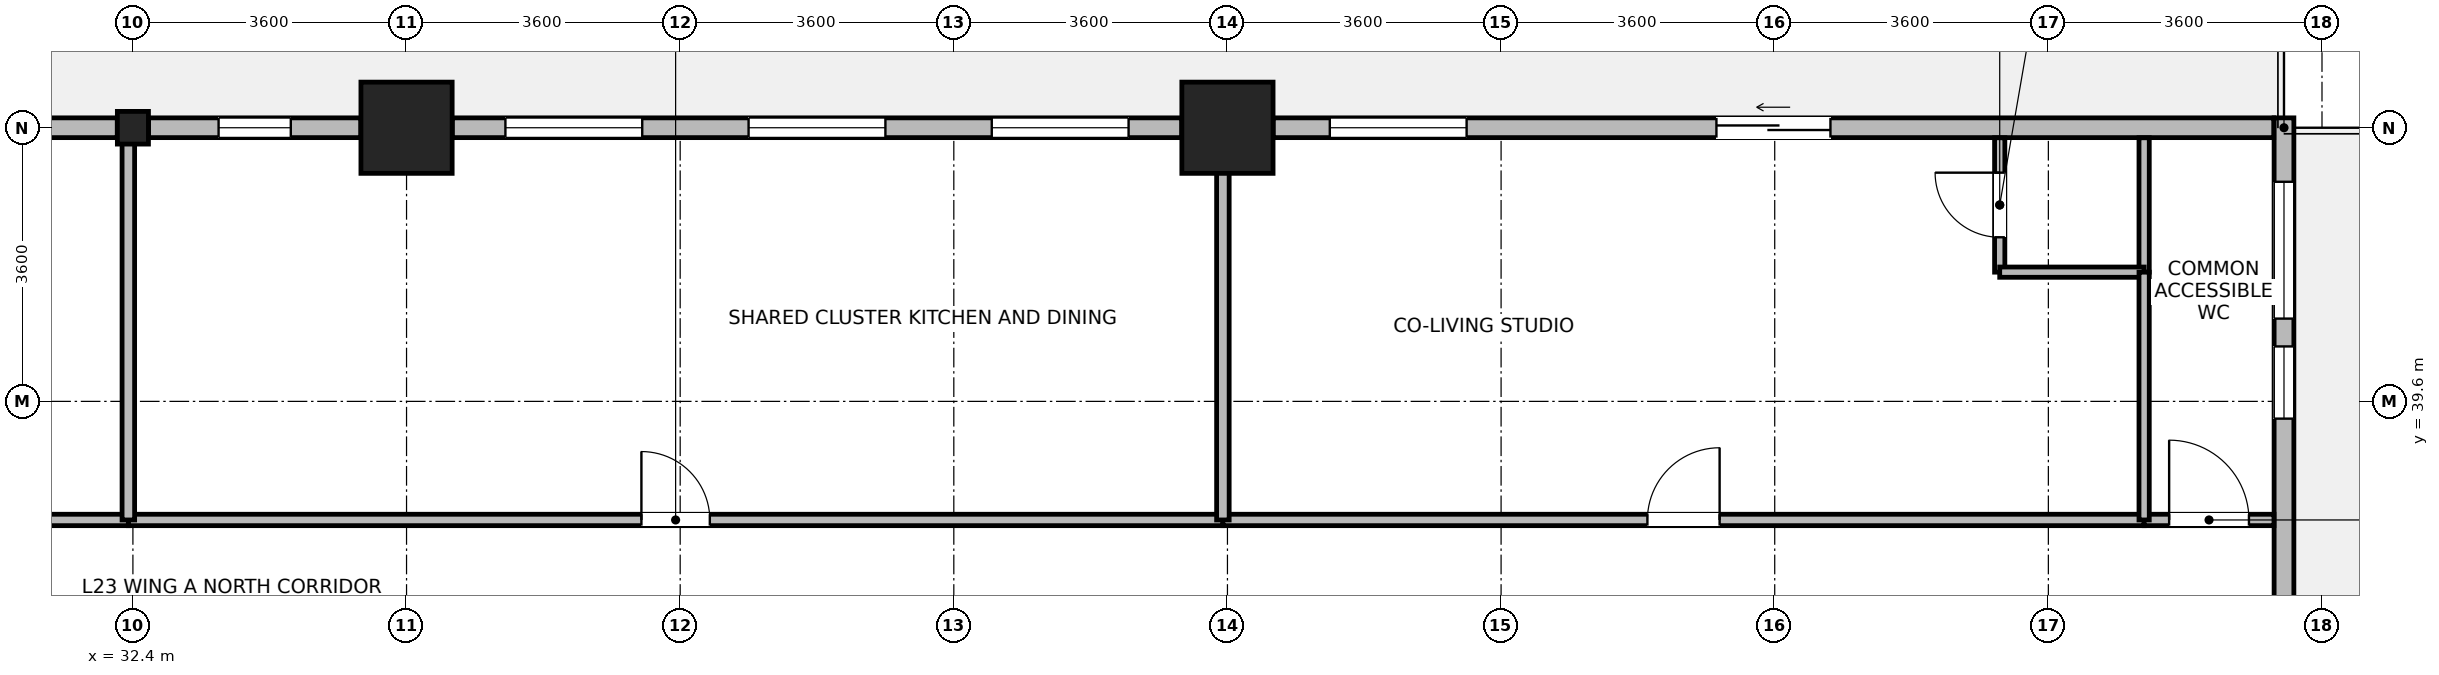
"""IFC4 building model, lengths in metres.
Left out: names, types, materials, properties, quantities, classifications, styles, units other than length and angle.
Written with IfcOpenShell. Run it as: python <this file> out.ifc"""

import sys

from ifc_helpers import new_model, si_unit, direction, frame, frame_2d, origin, origin_2d, place, context, subcontext, project, spatial, rectangle, i_section, extrude, source, transform, mapped, element, fill, save


model = new_model("IFC4")
c1 = context("Model", 3, precision=1e-05, world=origin(), true_north=direction((0.0, 1.0)))
c2 = subcontext(c1, "Body", "Model", "MODEL_VIEW")
j1 = project(units=[si_unit("LENGTHUNIT", "METRE"), si_unit("PLANEANGLEUNIT", "RADIAN")], contexts=[c1])
p1 = place(None, origin())
s1 = spatial("IfcSite", under=j1, at=p1, CompositionType="ELEMENT")
p2 = place(p1, origin())
s2 = spatial("IfcBuilding", under=s1, at=p2, CompositionType="ELEMENT")
p3 = place(p2, frame((0.0, 0.0, 93.4)))
s3 = spatial("IfcBuildingStorey", under=s2, at=p3, CompositionType="ELEMENT", Elevation=93.4)
m1 = source(origin(), c2, "Body", "SweptSolid", [
    extrude(rectangle(XDim=1.2, YDim=1.2, at=origin_2d()), origin(), (0.0, 0.0, 1.0), 3.7),
])
for number, where, z_axis, x_axis in (
    (1, (36.0, 43.2, 0.0), (0.0, 0.0, 1.0), (1.0, 0.0, 0.0)),
    (2, (46.8, 43.2, 0.0), (0.0, 0.0, 1.0), (1.0, 0.0, 0.0)),
):
    element("IfcColumn", number, at=place(p3, frame(where, z_axis=z_axis, x_axis=x_axis)), inside=s3, PredefinedType="COLUMN", context=c2, shape_type="MappedRepresentation", body=[
        mapped(m1, transform((0.0, 0.0, 0.0), x_axis=(1.0, 0.0, 0.0), y_axis=(0.0, 1.0, 0.0), z_axis=(0.0, 0.0, 1.0), scale=1.0)),
    ])
m2 = source(origin(), c2, "Body", "SweptSolid", [
    extrude(i_section(OverallWidth=0.409, OverallDepth=0.43, WebThickness=0.024, FlangeThickness=0.033, FilletRadius=0.015, at=origin_2d()), origin(), (0.0, 0.0, 1.0), 3.7),
])
p4 = place(p3, frame((32.4, 43.2, 0.0), z_axis=(0.0, 0.0, 1.0), x_axis=(1.0, 0.0, 0.0)))
e3 = element("IfcColumn", 3, at=p4, inside=s3, PredefinedType="COLUMN", context=c2, shape_type="MappedRepresentation", body=[
    mapped(m2, transform((0.0, 0.0, 0.0), x_axis=(1.0, 0.0, 0.0), y_axis=(0.0, 1.0, 0.0), z_axis=(0.0, 0.0, 1.0), scale=1.0)),
])
p5 = place(p3, frame((60.7, 43.33, 0.0), z_axis=(0.0, 0.0, 1.0), x_axis=(0.0, -1.0, 0.0)))
e4 = element("IfcWall", 4, at=p5, inside=s3, PredefinedType="STANDARD", context=c2, shape_type="SweptSolid", body=[
    extrude(rectangle(XDim=6.964, YDim=0.26, at=frame_2d((3.482, 0.0))), origin(), (0.0, 0.0, 1.0), 3.43),
])
p6 = place(p5, frame((0.841, 0.0, 0.85)))
e5 = element("IfcOpeningElement", 5, at=p6, cuts=e4, PredefinedType="OPENING", context=c2, shape_type="SweptSolid", body=[
    extrude(rectangle(XDim=1.8, YDim=1.85, at=frame_2d((0.9, 0.925))), frame((0.0, 0.14, 0.0), z_axis=(0.0, -1.0, 0.0), x_axis=(1.0, 0.0, 0.0)), (0.0, 0.0, 1.0), 0.28),
])
p7 = place(p5, frame((3.007, 0.0, 0.85)))
e6 = element("IfcOpeningElement", 6, at=p7, cuts=e4, PredefinedType="OPENING", context=c2, shape_type="SweptSolid", body=[
    extrude(rectangle(XDim=0.95, YDim=1.75, at=frame_2d((0.475, 0.875))), frame((0.0, 0.14, 0.0), z_axis=(0.0, -1.0, 0.0), x_axis=(1.0, 0.0, 0.0)), (0.0, 0.0, 1.0), 0.28),
])
p8 = place(p3, frame((47.401, 43.2, 0.0), z_axis=(0.0, 0.0, 1.0), x_axis=(1.0, 0.0, 0.0)))
e7 = element("IfcWall", 7, at=p8, inside=s3, PredefinedType="STANDARD", context=c2, shape_type="SweptSolid", body=[
    extrude(rectangle(XDim=13.164, YDim=0.26, at=frame_2d((6.582, 0.0))), origin(), (0.0, 0.0, 1.0), 3.43),
])
p9 = place(p8, frame((5.832, 0.0, 0.0)))
e8 = element("IfcOpeningElement", 8, at=p9, cuts=e7, PredefinedType="OPENING", context=c2, shape_type="SweptSolid", body=[
    extrude(rectangle(XDim=1.5, YDim=2.15, at=frame_2d((0.75, 1.075))), frame((0.0, 0.14, 0.0), z_axis=(0.0, -1.0, 0.0), x_axis=(1.0, 0.0, 0.0)), (0.0, 0.0, 1.0), 0.28),
])
p10 = place(p8, frame((0.746, 0.0, 0.85)))
e9 = element("IfcOpeningElement", 9, at=p10, cuts=e7, PredefinedType="OPENING", context=c2, shape_type="SweptSolid", body=[
    extrude(rectangle(XDim=1.8, YDim=1.85, at=frame_2d((0.9, 0.925))), frame((0.0, 0.14, 0.0), z_axis=(0.0, -1.0, 0.0), x_axis=(1.0, 0.0, 0.0)), (0.0, 0.0, 1.0), 0.28),
])
p11 = place(p3, frame((36.601, 43.2, 0.0), z_axis=(0.0, 0.0, 1.0), x_axis=(1.0, 0.0, 0.0)))
e10 = element("IfcWall", 10, at=p11, inside=s3, PredefinedType="STANDARD", context=c2, shape_type="SweptSolid", body=[
    extrude(rectangle(XDim=9.598, YDim=0.26, at=frame_2d((4.799, 0.0))), origin(), (0.0, 0.0, 1.0), 2.93),
])
p12 = place(p11, frame((0.7, 0.0, 0.85)))
e11 = element("IfcOpeningElement", 11, at=p12, cuts=e10, PredefinedType="OPENING", context=c2, shape_type="SweptSolid", body=[
    extrude(rectangle(XDim=1.8, YDim=1.85, at=frame_2d((0.9, 0.925))), frame((0.0, 0.14, 0.0), z_axis=(0.0, -1.0, 0.0), x_axis=(1.0, 0.0, 0.0)), (0.0, 0.0, 1.0), 0.28),
])
p13 = place(p11, frame((3.899, 0.0, 0.85)))
e12 = element("IfcOpeningElement", 12, at=p13, cuts=e10, PredefinedType="OPENING", context=c2, shape_type="SweptSolid", body=[
    extrude(rectangle(XDim=1.8, YDim=1.85, at=frame_2d((0.9, 0.925))), frame((0.0, 0.14, 0.0), z_axis=(0.0, -1.0, 0.0), x_axis=(1.0, 0.0, 0.0)), (0.0, 0.0, 1.0), 0.28),
])
p14 = place(p11, frame((7.098, 0.0, 0.85)))
e13 = element("IfcOpeningElement", 13, at=p14, cuts=e10, PredefinedType="OPENING", context=c2, shape_type="SweptSolid", body=[
    extrude(rectangle(XDim=1.8, YDim=1.85, at=frame_2d((0.9, 0.925))), frame((0.0, 0.14, 0.0), z_axis=(0.0, -1.0, 0.0), x_axis=(1.0, 0.0, 0.0)), (0.0, 0.0, 1.0), 0.28),
])
p15 = place(p3, frame((32.605, 43.2, 0.0), z_axis=(0.0, 0.0, 1.0), x_axis=(1.0, 0.0, 0.0)))
e14 = element("IfcWall", 14, at=p15, inside=s3, PredefinedType="STANDARD", context=c2, shape_type="SweptSolid", body=[
    extrude(rectangle(XDim=2.793, YDim=0.26, at=frame_2d((1.397, 0.0))), origin(), (0.0, 0.0, 1.0), 2.93),
])
p16 = place(p15, frame((0.922, 0.0, 0.85)))
e15 = element("IfcOpeningElement", 15, at=p16, cuts=e14, PredefinedType="OPENING", context=c2, shape_type="SweptSolid", body=[
    extrude(rectangle(XDim=0.95, YDim=1.75, at=frame_2d((0.475, 0.875))), frame((0.0, 0.14, 0.0), z_axis=(0.0, -1.0, 0.0), x_axis=(1.0, 0.0, 0.0)), (0.0, 0.0, 1.0), 0.28),
])
p17 = place(p3, frame((29.401, 43.2, 0.0), z_axis=(0.0, 0.0, 1.0), x_axis=(1.0, 0.0, 0.0)))
e16 = element("IfcWall", 16, at=p17, inside=s3, PredefinedType="STANDARD", context=c2, shape_type="SweptSolid", body=[
    extrude(rectangle(XDim=2.794, YDim=0.26, at=frame_2d((1.397, 0.0))), origin(), (0.0, 0.0, 1.0), 2.93),
])
p18 = place(p17, frame((0.922, 0.0, 0.85)))
e17 = element("IfcOpeningElement", 17, at=p18, cuts=e16, PredefinedType="OPENING", context=c2, shape_type="SweptSolid", body=[
    extrude(rectangle(XDim=0.95, YDim=1.75, at=frame_2d((0.475, 0.875))), frame((0.0, 0.14, 0.0), z_axis=(0.0, -1.0, 0.0), x_axis=(1.0, 0.0, 0.0)), (0.0, 0.0, 1.0), 0.28),
])
p19 = place(p3, frame((56.96, 41.3, 0.0), z_axis=(0.0, 0.0, 1.0), x_axis=(0.0, 1.0, 0.0)))
e18 = element("IfcWall", 18, at=p19, inside=s3, PredefinedType="PARTITIONING", context=c2, shape_type="SweptSolid", body=[
    extrude(rectangle(XDim=1.768, YDim=0.135, at=frame_2d((0.884, 0.0))), origin(), (0.0, 0.0, 1.0), 3.43),
])
p20 = place(p19, frame((0.459, 0.0, 0.0)))
e19 = element("IfcOpeningElement", 19, at=p20, cuts=e18, PredefinedType="OPENING", context=c2, shape_type="SweptSolid", body=[
    extrude(rectangle(XDim=0.85, YDim=2.04, at=frame_2d((0.425, 1.02))), frame((0.0, 0.078, 0.0), z_axis=(0.0, -1.0, 0.0), x_axis=(1.0, 0.0, 0.0)), (0.0, 0.0, 1.0), 0.155),
])
p21 = place(p3, frame((58.86, 41.3, 0.0), z_axis=(0.0, 0.0, 1.0), x_axis=(0.0, 1.0, 0.0)))
e20 = element("IfcWall", 20, at=p21, inside=s3, PredefinedType="PARTITIONING", context=c2, shape_type="SweptSolid", body=[
    extrude(rectangle(XDim=1.768, YDim=0.135, at=frame_2d((0.884, 0.0))), origin(), (0.0, 0.0, 1.0), 3.43),
])
p22 = place(p3, frame((56.96, 41.3, 0.0), z_axis=(0.0, 0.0, 1.0), x_axis=(1.0, 0.0, 0.0)))
e21 = element("IfcWall", 21, at=p22, inside=s3, PredefinedType="PARTITIONING", context=c2, shape_type="SweptSolid", body=[
    extrude(rectangle(XDim=1.9, YDim=0.135, at=frame_2d((0.95, 0.0))), origin(), (0.0, 0.0, 1.0), 3.43),
])
p23 = place(p3, frame((32.34, 38.04, 0.0), z_axis=(0.0, 0.0, 1.0), x_axis=(1.0, 0.0, 0.0)))
e22 = element("IfcWall", 22, at=p23, inside=s3, PredefinedType="PARTITIONING", context=c2, shape_type="SweptSolid", body=[
    extrude(rectangle(XDim=14.4, YDim=0.15, at=frame_2d((7.2, 0.0))), origin(), (0.0, 0.0, 1.0), 3.43),
])
p24 = place(p23, frame((6.75, 0.0, 0.0)))
e23 = element("IfcOpeningElement", 23, at=p24, cuts=e22, PredefinedType="OPENING", context=c2, shape_type="SweptSolid", body=[
    extrude(rectangle(XDim=0.9, YDim=2.08, at=frame_2d((0.45, 1.04))), frame((0.0, 0.085, 0.0), z_axis=(0.0, -1.0, 0.0), x_axis=(1.0, 0.0, 0.0)), (0.0, 0.0, 1.0), 0.17),
])
p25 = place(p3, frame((46.74, 38.04, 0.0), z_axis=(0.0, 0.0, 1.0), x_axis=(1.0, 0.0, 0.0)))
e24 = element("IfcWall", 24, at=p25, inside=s3, PredefinedType="PARTITIONING", context=c2, shape_type="SweptSolid", body=[
    extrude(rectangle(XDim=12.12, YDim=0.15, at=frame_2d((6.06, 0.0))), origin(), (0.0, 0.0, 1.0), 3.43),
])
p26 = place(p25, frame((5.585, 0.0, 0.0)))
e25 = element("IfcOpeningElement", 25, at=p26, cuts=e24, PredefinedType="OPENING", context=c2, shape_type="SweptSolid", body=[
    extrude(rectangle(XDim=0.95, YDim=2.1, at=frame_2d((0.475, 1.05))), frame((0.0, 0.085, 0.0), z_axis=(0.0, -1.0, 0.0), x_axis=(1.0, 0.0, 0.0)), (0.0, 0.0, 1.0), 0.17),
])
p27 = place(p3, frame((22.48, 38.04, 0.0), z_axis=(0.0, 0.0, 1.0), x_axis=(1.0, 0.0, 0.0)))
e26 = element("IfcWall", 26, at=p27, inside=s3, PredefinedType="PARTITIONING", context=c2, shape_type="SweptSolid", body=[
    extrude(rectangle(XDim=9.86, YDim=0.15, at=frame_2d((4.93, 0.0))), origin(), (0.0, 0.0, 1.0), 3.43),
])
p28 = place(p27, frame((4.455, 0.0, 0.0)))
e27 = element("IfcOpeningElement", 27, at=p28, cuts=e26, PredefinedType="OPENING", context=c2, shape_type="SweptSolid", body=[
    extrude(rectangle(XDim=0.95, YDim=2.1, at=frame_2d((0.475, 1.05))), frame((0.0, 0.085, 0.0), z_axis=(0.0, -1.0, 0.0), x_axis=(1.0, 0.0, 0.0)), (0.0, 0.0, 1.0), 0.17),
])
p29 = place(p3, frame((58.86, 38.04, 0.0), z_axis=(0.0, 0.0, 1.0), x_axis=(1.0, 0.0, 0.0)))
e28 = element("IfcWall", 28, at=p29, inside=s3, PredefinedType="PARTITIONING", context=c2, shape_type="SweptSolid", body=[
    extrude(rectangle(XDim=1.708, YDim=0.15, at=frame_2d((0.854, 0.0))), origin(), (0.0, 0.0, 1.0), 3.43),
])
p30 = place(p29, frame((0.329, 0.0, 0.0)))
e29 = element("IfcOpeningElement", 29, at=p30, cuts=e28, PredefinedType="OPENING", context=c2, shape_type="SweptSolid", body=[
    extrude(rectangle(XDim=1.05, YDim=2.12, at=frame_2d((0.525, 1.06))), frame((0.0, 0.085, 0.0), z_axis=(0.0, -1.0, 0.0), x_axis=(1.0, 0.0, 0.0)), (0.0, 0.0, 1.0), 0.17),
])
p31 = place(p3, frame((32.34, 38.04, 0.0), z_axis=(0.0, 0.0, 1.0), x_axis=(0.0, 1.0, 0.0)))
e30 = element("IfcWall", 30, at=p31, inside=s3, PredefinedType="PARTITIONING", context=c2, shape_type="SweptSolid", body=[
    extrude(rectangle(XDim=5.028, YDim=0.165, at=frame_2d((2.514, 0.0))), origin(), (0.0, 0.0, 1.0), 3.07),
])
p32 = place(p3, frame((46.74, 38.04, 0.0), z_axis=(0.0, 0.0, 1.0), x_axis=(0.0, 1.0, 0.0)))
e31 = element("IfcWall", 31, at=p32, inside=s3, PredefinedType="PARTITIONING", context=c2, shape_type="SweptSolid", body=[
    extrude(rectangle(XDim=5.028, YDim=0.165, at=frame_2d((2.514, 0.0))), origin(), (0.0, 0.0, 1.0), 2.93),
])
p33 = place(p3, frame((58.86, 38.04, 0.0), z_axis=(0.0, 0.0, 1.0), x_axis=(0.0, 1.0, 0.0)))
e32 = element("IfcWall", 32, at=p33, inside=s3, PredefinedType="PARTITIONING", context=c2, shape_type="SweptSolid", body=[
    extrude(rectangle(XDim=3.26, YDim=0.135, at=frame_2d((1.63, 0.0))), origin(), (0.0, 0.0, 1.0), 3.43),
])
p34 = place(p6, origin())
e33 = element("IfcWindow", 33, at=p34, inside=s3, PartitioningType="SINGLE_PANEL", PredefinedType="WINDOW", context=c2, shape_type="SweptSolid", body=[
    extrude(rectangle(XDim=1.8, YDim=1.85, at=frame_2d((0.9, 0.925))), frame((0.0, 0.03, 0.0), z_axis=(0.0, -1.0, 0.0), x_axis=(1.0, 0.0, 0.0)), (0.0, 0.0, 1.0), 0.06),
])
fill(e5, e33)
p35 = place(p7, origin())
e34 = element("IfcWindow", 34, at=p35, inside=s3, PartitioningType="SINGLE_PANEL", PredefinedType="WINDOW", context=c2, shape_type="SweptSolid", body=[
    extrude(rectangle(XDim=0.95, YDim=1.75, at=frame_2d((0.475, 0.875))), frame((0.0, 0.03, 0.0), z_axis=(0.0, -1.0, 0.0), x_axis=(1.0, 0.0, 0.0)), (0.0, 0.0, 1.0), 0.06),
])
fill(e6, e34)
p36 = place(p9, origin())
e35 = element("IfcDoor", 35, at=p36, inside=s3, OperationType="SLIDING_TO_LEFT", PredefinedType="DOOR", context=c2, shape_type="SweptSolid", body=[
    extrude(rectangle(XDim=1.5, YDim=2.15, at=frame_2d((0.75, 1.075))), frame((0.0, 0.025, 0.0), z_axis=(0.0, -1.0, 0.0), x_axis=(1.0, 0.0, 0.0)), (0.0, 0.0, 1.0), 0.05),
])
fill(e8, e35)
p37 = place(p10, origin())
e36 = element("IfcWindow", 36, at=p37, inside=s3, PartitioningType="SINGLE_PANEL", PredefinedType="WINDOW", context=c2, shape_type="SweptSolid", body=[
    extrude(rectangle(XDim=1.8, YDim=1.85, at=frame_2d((0.9, 0.925))), frame((0.0, 0.03, 0.0), z_axis=(0.0, -1.0, 0.0), x_axis=(1.0, 0.0, 0.0)), (0.0, 0.0, 1.0), 0.06),
])
fill(e9, e36)
p38 = place(p12, origin())
e37 = element("IfcWindow", 37, at=p38, inside=s3, PartitioningType="SINGLE_PANEL", PredefinedType="WINDOW", context=c2, shape_type="SweptSolid", body=[
    extrude(rectangle(XDim=1.8, YDim=1.85, at=frame_2d((0.9, 0.925))), frame((0.0, 0.03, 0.0), z_axis=(0.0, -1.0, 0.0), x_axis=(1.0, 0.0, 0.0)), (0.0, 0.0, 1.0), 0.06),
])
fill(e11, e37)
p39 = place(p13, origin())
e38 = element("IfcWindow", 38, at=p39, inside=s3, PartitioningType="SINGLE_PANEL", PredefinedType="WINDOW", context=c2, shape_type="SweptSolid", body=[
    extrude(rectangle(XDim=1.8, YDim=1.85, at=frame_2d((0.9, 0.925))), frame((0.0, 0.03, 0.0), z_axis=(0.0, -1.0, 0.0), x_axis=(1.0, 0.0, 0.0)), (0.0, 0.0, 1.0), 0.06),
])
fill(e12, e38)
p40 = place(p14, origin())
e39 = element("IfcWindow", 39, at=p40, inside=s3, PartitioningType="SINGLE_PANEL", PredefinedType="WINDOW", context=c2, shape_type="SweptSolid", body=[
    extrude(rectangle(XDim=1.8, YDim=1.85, at=frame_2d((0.9, 0.925))), frame((0.0, 0.03, 0.0), z_axis=(0.0, -1.0, 0.0), x_axis=(1.0, 0.0, 0.0)), (0.0, 0.0, 1.0), 0.06),
])
fill(e13, e39)
p41 = place(p16, origin())
e40 = element("IfcWindow", 40, at=p41, inside=s3, PartitioningType="SINGLE_PANEL", PredefinedType="WINDOW", context=c2, shape_type="SweptSolid", body=[
    extrude(rectangle(XDim=0.95, YDim=1.75, at=frame_2d((0.475, 0.875))), frame((0.0, 0.03, 0.0), z_axis=(0.0, -1.0, 0.0), x_axis=(1.0, 0.0, 0.0)), (0.0, 0.0, 1.0), 0.06),
])
fill(e15, e40)
p42 = place(p20, origin())
e41 = element("IfcDoor", 41, at=p42, inside=s3, OperationType="SINGLE_SWING_RIGHT", PredefinedType="DOOR", context=c2, shape_type="SweptSolid", body=[
    extrude(rectangle(XDim=0.85, YDim=2.04, at=frame_2d((0.425, 1.02))), frame((0.0, 0.025, 0.0), z_axis=(0.0, -1.0, 0.0), x_axis=(1.0, 0.0, 0.0)), (0.0, 0.0, 1.0), 0.05),
])
fill(e19, e41)
p43 = place(p24, origin())
e42 = element("IfcDoor", 42, at=p43, inside=s3, OperationType="SINGLE_SWING_LEFT", PredefinedType="DOOR", context=c2, shape_type="SweptSolid", body=[
    extrude(rectangle(XDim=0.9, YDim=2.08, at=frame_2d((0.45, 1.04))), frame((0.0, 0.025, 0.0), z_axis=(0.0, -1.0, 0.0), x_axis=(1.0, 0.0, 0.0)), (0.0, 0.0, 1.0), 0.05),
])
fill(e23, e42)
p44 = place(p26, origin())
e43 = element("IfcDoor", 43, at=p44, inside=s3, OperationType="SINGLE_SWING_RIGHT", PredefinedType="DOOR", context=c2, shape_type="SweptSolid", body=[
    extrude(rectangle(XDim=0.95, YDim=2.1, at=frame_2d((0.475, 1.05))), frame((0.0, 0.025, 0.0), z_axis=(0.0, -1.0, 0.0), x_axis=(1.0, 0.0, 0.0)), (0.0, 0.0, 1.0), 0.05),
])
fill(e25, e43)
p45 = place(p30, origin())
e44 = element("IfcDoor", 44, at=p45, inside=s3, OperationType="SINGLE_SWING_LEFT", PredefinedType="DOOR", context=c2, shape_type="SweptSolid", body=[
    extrude(rectangle(XDim=1.05, YDim=2.12, at=frame_2d((0.525, 1.06))), frame((0.0, 0.025, 0.0), z_axis=(0.0, -1.0, 0.0), x_axis=(1.0, 0.0, 0.0)), (0.0, 0.0, 1.0), 0.05),
])
fill(e29, e44)
save(model, sys.argv[1])
